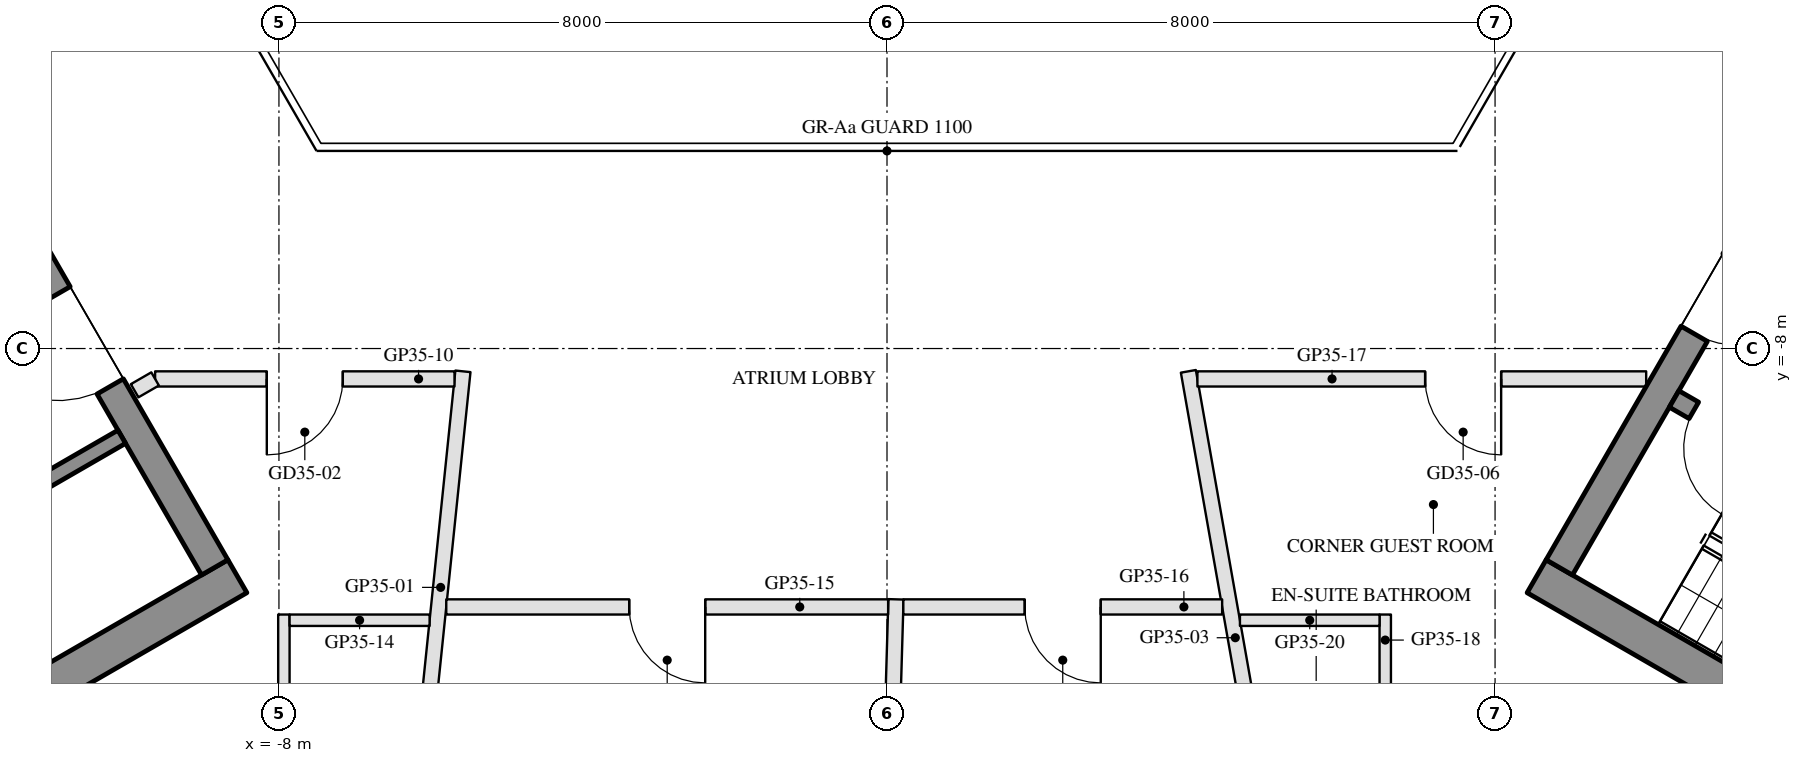
"""IFC4 building model, lengths in metres.
Left out: names, types, materials, properties, quantities, classifications, styles, units other than length and angle.
Written with IfcOpenShell. Run it as: python <this file> out.ifc"""

import sys

from ifc_helpers import new_model, si_unit, direction, frame, frame_2d, origin, place, context, subcontext, project, spatial, rectangle, extrude, element, fill, save


model = new_model("IFC4")
c1 = context("Model", 3, precision=1e-05, world=origin(), true_north=direction((0.0, 1.0)))
c2 = subcontext(c1, "Body", "Model", "MODEL_VIEW")
j1 = project(units=[si_unit("LENGTHUNIT", "METRE"), si_unit("PLANEANGLEUNIT", "RADIAN")], contexts=[c1])
p1 = place(None, origin())
s1 = spatial("IfcSite", under=j1, at=p1, CompositionType="ELEMENT")
p2 = place(p1, origin())
s2 = spatial("IfcBuilding", under=s1, at=p2, CompositionType="ELEMENT")
p3 = place(p2, frame((0.0, 0.0, 324.4)))
s3 = spatial("IfcBuildingStorey", under=s2, at=p3, CompositionType="ELEMENT", Elevation=324.4)
p4 = place(p3, frame((-8.547, -10.997, 0.0), z_axis=(0.0, 0.0, 1.0), x_axis=(-0.866030186143, -0.49999171662, 0.0)))
e1 = element("IfcWall", 1, at=p4, inside=s3, PredefinedType="SHEAR", context=c2, shape_type="SweptSolid", body=[
    extrude(rectangle(XDim=8.267, YDim=0.5, at=frame_2d((4.134, 0.0))), origin(), (0.0, 0.0, 1.0), 3.5),
])
p5 = place(p3, frame((-13.845, -2.22, 0.0), z_axis=(0.0, 0.0, 1.0), x_axis=(0.500004234368, -0.866022959057, 0.0)))
e2 = element("IfcWall", 2, at=p5, inside=s3, PredefinedType="SHEAR", context=c2, shape_type="SweptSolid", body=[
    extrude(rectangle(XDim=10.0, YDim=0.4, at=frame_2d((5.0, 0.0))), origin(), (0.0, 0.0, 1.0), 3.5),
])
p6 = place(p5, frame((3.55, 0.0, 0.0)))
e3 = element("IfcOpeningElement", 3, at=p6, cuts=e2, PredefinedType="OPENING", context=c2, shape_type="SweptSolid", body=[
    extrude(rectangle(XDim=1.1, YDim=2.1, at=frame_2d((0.55, 1.05))), frame((0.0, 0.21, 0.0), z_axis=(0.0, -1.0, 0.0), x_axis=(1.0, 0.0, 0.0)), (0.0, 0.0, 1.0), 0.42),
])
p7 = place(p5, frame((5.85, 0.0, 0.0)))
e4 = element("IfcOpeningElement", 4, at=p7, cuts=e2, PredefinedType="OPENING", context=c2, shape_type="SweptSolid", body=[
    extrude(rectangle(XDim=1.4, YDim=2.1, at=frame_2d((0.7, 1.05))), frame((0.0, 0.21, 0.0), z_axis=(0.0, -1.0, 0.0), x_axis=(1.0, 0.0, 0.0)), (0.0, 0.0, 1.0), 0.42),
])
p8 = place(p3, frame((-10.068, -9.162, 0.0), z_axis=(0.0, 0.0, 1.0), x_axis=(-0.866027741594, -0.499995950774, 0.0)))
e5 = element("IfcWall", 5, at=p8, inside=s3, PredefinedType="SHEAR", context=c2, shape_type="SweptSolid", body=[
    extrude(rectangle(XDim=9.272, YDim=0.2, at=frame_2d((4.636, 0.0))), origin(), (0.0, 0.0, 1.0), 3.5),
])
p9 = place(p8, frame((4.169, 0.0, 0.0)))
e6 = element("IfcOpeningElement", 6, at=p9, cuts=e5, PredefinedType="OPENING", context=c2, shape_type="SweptSolid", body=[
    extrude(rectangle(XDim=0.9, YDim=2.1, at=frame_2d((0.45, 1.05))), frame((0.0, 0.11, 0.0), z_axis=(0.0, -1.0, 0.0), x_axis=(1.0, 0.0, 0.0)), (0.0, 0.0, 1.0), 0.22),
])
p10 = place(p3, frame((8.547, -10.997, 0.0), z_axis=(0.0, 0.0, 1.0), x_axis=(0.866030186143, -0.49999171662, 0.0)))
e7 = element("IfcWall", 7, at=p10, inside=s3, PredefinedType="SHEAR", context=c2, shape_type="SweptSolid", body=[
    extrude(rectangle(XDim=8.267, YDim=0.5, at=frame_2d((4.134, 0.0))), origin(), (0.0, 0.0, 1.0), 3.5),
])
p11 = place(p3, frame((8.845, -10.88, 0.0), z_axis=(0.0, 0.0, 1.0), x_axis=(0.500004234368, 0.866022959057, 0.0)))
e8 = element("IfcWall", 8, at=p11, inside=s3, PredefinedType="SHEAR", context=c2, shape_type="SweptSolid", body=[
    extrude(rectangle(XDim=10.0, YDim=0.4, at=frame_2d((5.0, 0.0))), origin(), (0.0, 0.0, 1.0), 3.5),
])
p12 = place(p11, frame((3.55, 0.0, 0.0)))
e9 = element("IfcOpeningElement", 9, at=p12, cuts=e8, PredefinedType="OPENING", context=c2, shape_type="SweptSolid", body=[
    extrude(rectangle(XDim=1.1, YDim=2.1, at=frame_2d((0.55, 1.05))), frame((0.0, 0.21, 0.0), z_axis=(0.0, -1.0, 0.0), x_axis=(1.0, 0.0, 0.0)), (0.0, 0.0, 1.0), 0.42),
])
p13 = place(p11, frame((5.85, 0.0, 0.0)))
e10 = element("IfcOpeningElement", 10, at=p13, cuts=e8, PredefinedType="OPENING", context=c2, shape_type="SweptSolid", body=[
    extrude(rectangle(XDim=1.4, YDim=2.1, at=frame_2d((0.7, 1.05))), frame((0.0, 0.21, 0.0), z_axis=(0.0, -1.0, 0.0), x_axis=(1.0, 0.0, 0.0)), (0.0, 0.0, 1.0), 0.42),
])
p14 = place(p3, frame((10.356, -8.664, 0.0), z_axis=(0.0, 0.0, 1.0), x_axis=(0.866028629588, -0.499994412703, 0.0)))
e11 = element("IfcWall", 11, at=p14, inside=s3, PredefinedType="SHEAR", context=c2, shape_type="SweptSolid", body=[
    extrude(rectangle(XDim=6.45, YDim=0.25, at=frame_2d((3.225, 0.0))), origin(), (0.0, 0.0, 1.0), 3.5),
])
p15 = place(p14, frame((0.3, 0.0, 0.0)))
e12 = element("IfcOpeningElement", 12, at=p15, cuts=e11, PredefinedType="OPENING", context=c2, shape_type="SweptSolid", body=[
    extrude(rectangle(XDim=1.0, YDim=2.1, at=frame_2d((0.5, 1.05))), frame((0.0, 0.135, 0.0), z_axis=(0.0, -1.0, 0.0), x_axis=(1.0, 0.0, 0.0)), (0.0, 0.0, 1.0), 0.27),
])
p16 = place(p3, frame((-6.166, -13.985, 0.0), z_axis=(0.0, 0.0, 1.0), x_axis=(0.102603302072, 0.994722354431, 0.0)))
e13 = element("IfcWall", 13, at=p16, inside=s3, PredefinedType="PARTITIONING", context=c2, shape_type="SweptSolid", body=[
    extrude(rectangle(XDim=5.716, YDim=0.2, at=frame_2d((2.858, 0.0))), origin(), (0.0, 0.0, 1.0), 3.1),
])
p17 = place(p3, frame((0.039, -13.985, 0.0), z_axis=(0.0, 0.0, 1.0), x_axis=(0.029444451266, 0.999566418148, 0.0)))
e14 = element("IfcWall", 14, at=p17, inside=s3, PredefinedType="PARTITIONING", context=c2, shape_type="SweptSolid", body=[
    extrude(rectangle(XDim=2.687, YDim=0.2, at=frame_2d((1.343, 0.0))), origin(), (0.0, 0.0, 1.0), 3.15),
])
p18 = place(p3, frame((5.2, -15.31, 0.0), z_axis=(0.0, 0.0, 1.0), x_axis=(-0.173513360602, 0.984831515384, 0.0)))
e15 = element("IfcWall", 15, at=p18, inside=s3, PredefinedType="PARTITIONING", context=c2, shape_type="SweptSolid", body=[
    extrude(rectangle(XDim=7.118, YDim=0.2, at=frame_2d((3.559, 0.0))), origin(), (0.0, 0.0, 1.0), 3.1),
])
p19 = place(p3, frame((-5.69, -8.4, 0.0), z_axis=(0.0, 0.0, 1.0), x_axis=(-1.0, 0.0, 0.0)))
e16 = element("IfcWall", 16, at=p19, inside=s3, PredefinedType="PARTITIONING", context=c2, shape_type="SweptSolid", body=[
    extrude(rectangle(XDim=3.939, YDim=0.2, at=frame_2d((1.969, 0.0))), origin(), (0.0, 0.0, 1.0), 3.15),
])
p20 = place(p19, frame((1.469, 0.0, 0.0)))
e17 = element("IfcOpeningElement", 17, at=p20, cuts=e16, PredefinedType="OPENING", context=c2, shape_type="SweptSolid", body=[
    extrude(rectangle(XDim=1.0, YDim=2.1, at=frame_2d((0.5, 1.05))), frame((0.0, 0.11, 0.0), z_axis=(0.0, -1.0, 0.0), x_axis=(1.0, 0.0, 0.0)), (0.0, 0.0, 1.0), 0.22),
])
p21 = place(p3, frame((-9.629, -8.4, 0.0), z_axis=(0.0, 0.0, 1.0), x_axis=(-0.865963302823, -0.500107546598, 0.0)))
e18 = element("IfcWall", 18, at=p21, inside=s3, PredefinedType="PARTITIONING", context=c2, shape_type="SweptSolid", body=[
    extrude(rectangle(XDim=0.311, YDim=0.2, at=frame_2d((0.156, 0.0))), origin(), (0.0, 0.0, 1.0), 3.55),
])
p22 = place(p3, frame((-7.935, -11.5, 0.0), z_axis=(0.0, 0.0, 1.0), x_axis=(0.0, -1.0, 0.0)))
e19 = element("IfcWall", 19, at=p22, inside=s3, PredefinedType="PARTITIONING", context=c2, shape_type="SweptSolid", body=[
    extrude(rectangle(XDim=2.8, YDim=0.15, at=frame_2d((1.4, 0.0))), origin(), (0.0, 0.0, 1.0), 3.1),
])
p23 = place(p22, frame((1.4, 0.0, 0.0)))
e20 = element("IfcOpeningElement", 20, at=p23, cuts=e19, PredefinedType="OPENING", context=c2, shape_type="SweptSolid", body=[
    extrude(rectangle(XDim=0.9, YDim=2.1, at=frame_2d((0.45, 1.05))), frame((0.0, 0.085, 0.0), z_axis=(0.0, -1.0, 0.0), x_axis=(1.0, 0.0, 0.0)), (0.0, 0.0, 1.0), 0.17),
])
p24 = place(p3, frame((-7.86, -11.575, 0.0), z_axis=(0.0, 0.0, 1.0), x_axis=(1.0, 0.0, 0.0)))
e21 = element("IfcWall", 21, at=p24, inside=s3, PredefinedType="PARTITIONING", context=c2, shape_type="SweptSolid", body=[
    extrude(rectangle(XDim=1.843, YDim=0.15, at=frame_2d((0.921, 0.0))), origin(), (0.0, 0.0, 1.0), 3.15),
])
p25 = place(p3, frame((0.015, -11.4, 0.0), z_axis=(0.0, 0.0, 1.0), x_axis=(-1.0, 0.0, 0.0)))
e22 = element("IfcWall", 22, at=p25, inside=s3, PredefinedType="PARTITIONING", context=c2, shape_type="SweptSolid", body=[
    extrude(rectangle(XDim=5.813, YDim=0.2, at=frame_2d((2.907, 0.0))), origin(), (0.0, 0.0, 1.0), 3.15),
])
p26 = place(p25, frame((2.407, 0.0, 0.0)))
e23 = element("IfcOpeningElement", 23, at=p26, cuts=e22, PredefinedType="OPENING", context=c2, shape_type="SweptSolid", body=[
    extrude(rectangle(XDim=1.0, YDim=2.1, at=frame_2d((0.5, 1.05))), frame((0.0, 0.11, 0.0), z_axis=(0.0, -1.0, 0.0), x_axis=(1.0, 0.0, 0.0)), (0.0, 0.0, 1.0), 0.22),
])
p27 = place(p3, frame((4.409, -11.4, 0.0), z_axis=(0.0, 0.0, 1.0), x_axis=(-1.0, 0.0, 0.0)))
e24 = element("IfcWall", 24, at=p27, inside=s3, PredefinedType="PARTITIONING", context=c2, shape_type="SweptSolid", body=[
    extrude(rectangle(XDim=4.195, YDim=0.2, at=frame_2d((2.097, 0.0))), origin(), (0.0, 0.0, 1.0), 3.15),
])
p28 = place(p27, frame((1.597, 0.0, 0.0)))
e25 = element("IfcOpeningElement", 25, at=p28, cuts=e24, PredefinedType="OPENING", context=c2, shape_type="SweptSolid", body=[
    extrude(rectangle(XDim=1.0, YDim=2.1, at=frame_2d((0.5, 1.05))), frame((0.0, 0.11, 0.0), z_axis=(0.0, -1.0, 0.0), x_axis=(1.0, 0.0, 0.0)), (0.0, 0.0, 1.0), 0.22),
])
p29 = place(p3, frame((9.988, -8.4, 0.0), z_axis=(0.0, 0.0, 1.0), x_axis=(-1.0, 0.0, 0.0)))
e26 = element("IfcWall", 26, at=p29, inside=s3, PredefinedType="PARTITIONING", context=c2, shape_type="SweptSolid", body=[
    extrude(rectangle(XDim=5.904, YDim=0.2, at=frame_2d((2.952, 0.0))), origin(), (0.0, 0.0, 1.0), 3.15),
])
p30 = place(p29, frame((1.908, 0.0, 0.0)))
e27 = element("IfcOpeningElement", 27, at=p30, cuts=e26, PredefinedType="OPENING", context=c2, shape_type="SweptSolid", body=[
    extrude(rectangle(XDim=1.0, YDim=2.1, at=frame_2d((0.5, 1.05))), frame((0.0, 0.11, 0.0), z_axis=(0.0, -1.0, 0.0), x_axis=(1.0, 0.0, 0.0)), (0.0, 0.0, 1.0), 0.22),
])
p31 = place(p3, frame((6.555, -14.3, 0.0), z_axis=(0.0, 0.0, 1.0), x_axis=(0.0, 1.0, 0.0)))
e28 = element("IfcWall", 28, at=p31, inside=s3, PredefinedType="PARTITIONING", context=c2, shape_type="SweptSolid", body=[
    extrude(rectangle(XDim=2.8, YDim=0.15, at=frame_2d((1.4, 0.0))), origin(), (0.0, 0.0, 1.0), 3.1),
])
p32 = place(p31, frame((0.5, 0.0, 0.0)))
e29 = element("IfcOpeningElement", 29, at=p32, cuts=e28, PredefinedType="OPENING", context=c2, shape_type="SweptSolid", body=[
    extrude(rectangle(XDim=0.9, YDim=2.1, at=frame_2d((0.45, 1.05))), frame((0.0, 0.085, 0.0), z_axis=(0.0, -1.0, 0.0), x_axis=(1.0, 0.0, 0.0)), (0.0, 0.0, 1.0), 0.17),
])
p33 = place(p3, frame((4.643, -11.575, 0.0), z_axis=(0.0, 0.0, 1.0), x_axis=(1.0, 0.0, 0.0)))
e30 = element("IfcWall", 30, at=p33, inside=s3, PredefinedType="PARTITIONING", context=c2, shape_type="SweptSolid", body=[
    extrude(rectangle(XDim=1.837, YDim=0.15, at=frame_2d((0.918, 0.0))), origin(), (0.0, 0.0, 1.0), 3.15),
])
p34 = place(p3, frame((10.896, -2.873, 0.0), z_axis=(0.0, 0.0, 1.0), x_axis=(0.716974970554, -0.697098910916, 0.0)))
e31 = element("IfcWall", 31, at=p34, inside=s3, PredefinedType="PARTITIONING", context=c2, shape_type="SweptSolid", body=[
    extrude(rectangle(XDim=2.039, YDim=0.2, at=frame_2d((1.02, 0.0))), origin(), (0.0, 0.0, 1.0), 3.55),
])
p35 = place(p34, frame((0.52, 0.0, 0.0)))
e32 = element("IfcOpeningElement", 32, at=p35, cuts=e31, PredefinedType="OPENING", context=c2, shape_type="SweptSolid", body=[
    extrude(rectangle(XDim=1.0, YDim=2.1, at=frame_2d((0.5, 1.05))), frame((0.0, 0.11, 0.0), z_axis=(0.0, -1.0, 0.0), x_axis=(1.0, 0.0, 0.0)), (0.0, 0.0, 1.0), 0.22),
])
p36 = place(p3, frame((-12.038, -4.85, 0.0), z_axis=(0.0, 0.0, 1.0), x_axis=(0.500003693016, 0.86602327161, 0.0)))
e33 = element("IfcWall", 33, at=p36, inside=s3, PredefinedType="PARTITIONING", context=c2, shape_type="SweptSolid", body=[
    extrude(rectangle(XDim=5.035, YDim=0.2, at=frame_2d((2.517, 0.0))), origin(), (0.0, 0.0, 1.0), 3.15),
])
p37 = place(p36, frame((1.568, 0.0, 0.0)))
e34 = element("IfcOpeningElement", 34, at=p37, cuts=e33, PredefinedType="OPENING", context=c2, shape_type="SweptSolid", body=[
    extrude(rectangle(XDim=1.0, YDim=2.1, at=frame_2d((0.5, 1.05))), frame((0.0, 0.11, 0.0), z_axis=(0.0, -1.0, 0.0), x_axis=(1.0, 0.0, 0.0)), (0.0, 0.0, 1.0), 0.22),
])
p38 = place(p7, frame((1.4, 0.0, 0.0), z_axis=(0.0, 0.0, 1.0), x_axis=(-1.0, 0.0, 0.0)))
e35 = element("IfcDoor", 35, at=p38, inside=s3, OperationType="DOUBLE_DOOR_SINGLE_SWING", PredefinedType="DOOR", context=c2, shape_type="SweptSolid", body=[
    extrude(rectangle(XDim=1.4, YDim=2.1, at=frame_2d((0.7, 1.05))), frame((0.0, 0.025, 0.0), z_axis=(0.0, -1.0, 0.0), x_axis=(1.0, 0.0, 0.0)), (0.0, 0.0, 1.0), 0.05),
])
fill(e4, e35)
p39 = place(p12, frame((1.1, 0.0, 0.0), z_axis=(0.0, 0.0, 1.0), x_axis=(-1.0, 0.0, 0.0)))
e36 = element("IfcDoor", 36, at=p39, inside=s3, OperationType="SINGLE_SWING_LEFT", PredefinedType="DOOR", context=c2, shape_type="SweptSolid", body=[
    extrude(rectangle(XDim=1.1, YDim=2.1, at=frame_2d((0.55, 1.05))), frame((0.0, 0.025, 0.0), z_axis=(0.0, -1.0, 0.0), x_axis=(1.0, 0.0, 0.0)), (0.0, 0.0, 1.0), 0.05),
])
fill(e9, e36)
p40 = place(p15, frame((1.0, 0.0, 0.0), z_axis=(0.0, 0.0, 1.0), x_axis=(-1.0, 0.0, 0.0)))
e37 = element("IfcDoor", 37, at=p40, inside=s3, OperationType="SINGLE_SWING_LEFT", PredefinedType="DOOR", context=c2, shape_type="SweptSolid", body=[
    extrude(rectangle(XDim=1.0, YDim=2.1, at=frame_2d((0.5, 1.05))), frame((0.0, 0.025, 0.0), z_axis=(0.0, -1.0, 0.0), x_axis=(1.0, 0.0, 0.0)), (0.0, 0.0, 1.0), 0.05),
])
fill(e12, e37)
p41 = place(p20, origin())
e38 = element("IfcDoor", 38, at=p41, inside=s3, OperationType="SINGLE_SWING_RIGHT", PredefinedType="DOOR", context=c2, shape_type="SweptSolid", body=[
    extrude(rectangle(XDim=1.0, YDim=2.1, at=frame_2d((0.5, 1.05))), frame((0.0, 0.025, 0.0), z_axis=(0.0, -1.0, 0.0), x_axis=(1.0, 0.0, 0.0)), (0.0, 0.0, 1.0), 0.05),
])
fill(e17, e38)
p42 = place(p26, origin())
e39 = element("IfcDoor", 39, at=p42, inside=s3, OperationType="SINGLE_SWING_LEFT", PredefinedType="DOOR", context=c2, shape_type="SweptSolid", body=[
    extrude(rectangle(XDim=1.0, YDim=2.1, at=frame_2d((0.5, 1.05))), frame((0.0, 0.025, 0.0), z_axis=(0.0, -1.0, 0.0), x_axis=(1.0, 0.0, 0.0)), (0.0, 0.0, 1.0), 0.05),
])
fill(e23, e39)
p43 = place(p28, origin())
e40 = element("IfcDoor", 40, at=p43, inside=s3, OperationType="SINGLE_SWING_LEFT", PredefinedType="DOOR", context=c2, shape_type="SweptSolid", body=[
    extrude(rectangle(XDim=1.0, YDim=2.1, at=frame_2d((0.5, 1.05))), frame((0.0, 0.025, 0.0), z_axis=(0.0, -1.0, 0.0), x_axis=(1.0, 0.0, 0.0)), (0.0, 0.0, 1.0), 0.05),
])
fill(e25, e40)
p44 = place(p30, origin())
e41 = element("IfcDoor", 41, at=p44, inside=s3, OperationType="SINGLE_SWING_LEFT", PredefinedType="DOOR", context=c2, shape_type="SweptSolid", body=[
    extrude(rectangle(XDim=1.0, YDim=2.1, at=frame_2d((0.5, 1.05))), frame((0.0, 0.025, 0.0), z_axis=(0.0, -1.0, 0.0), x_axis=(1.0, 0.0, 0.0)), (0.0, 0.0, 1.0), 0.05),
])
fill(e27, e41)
save(model, sys.argv[1])
